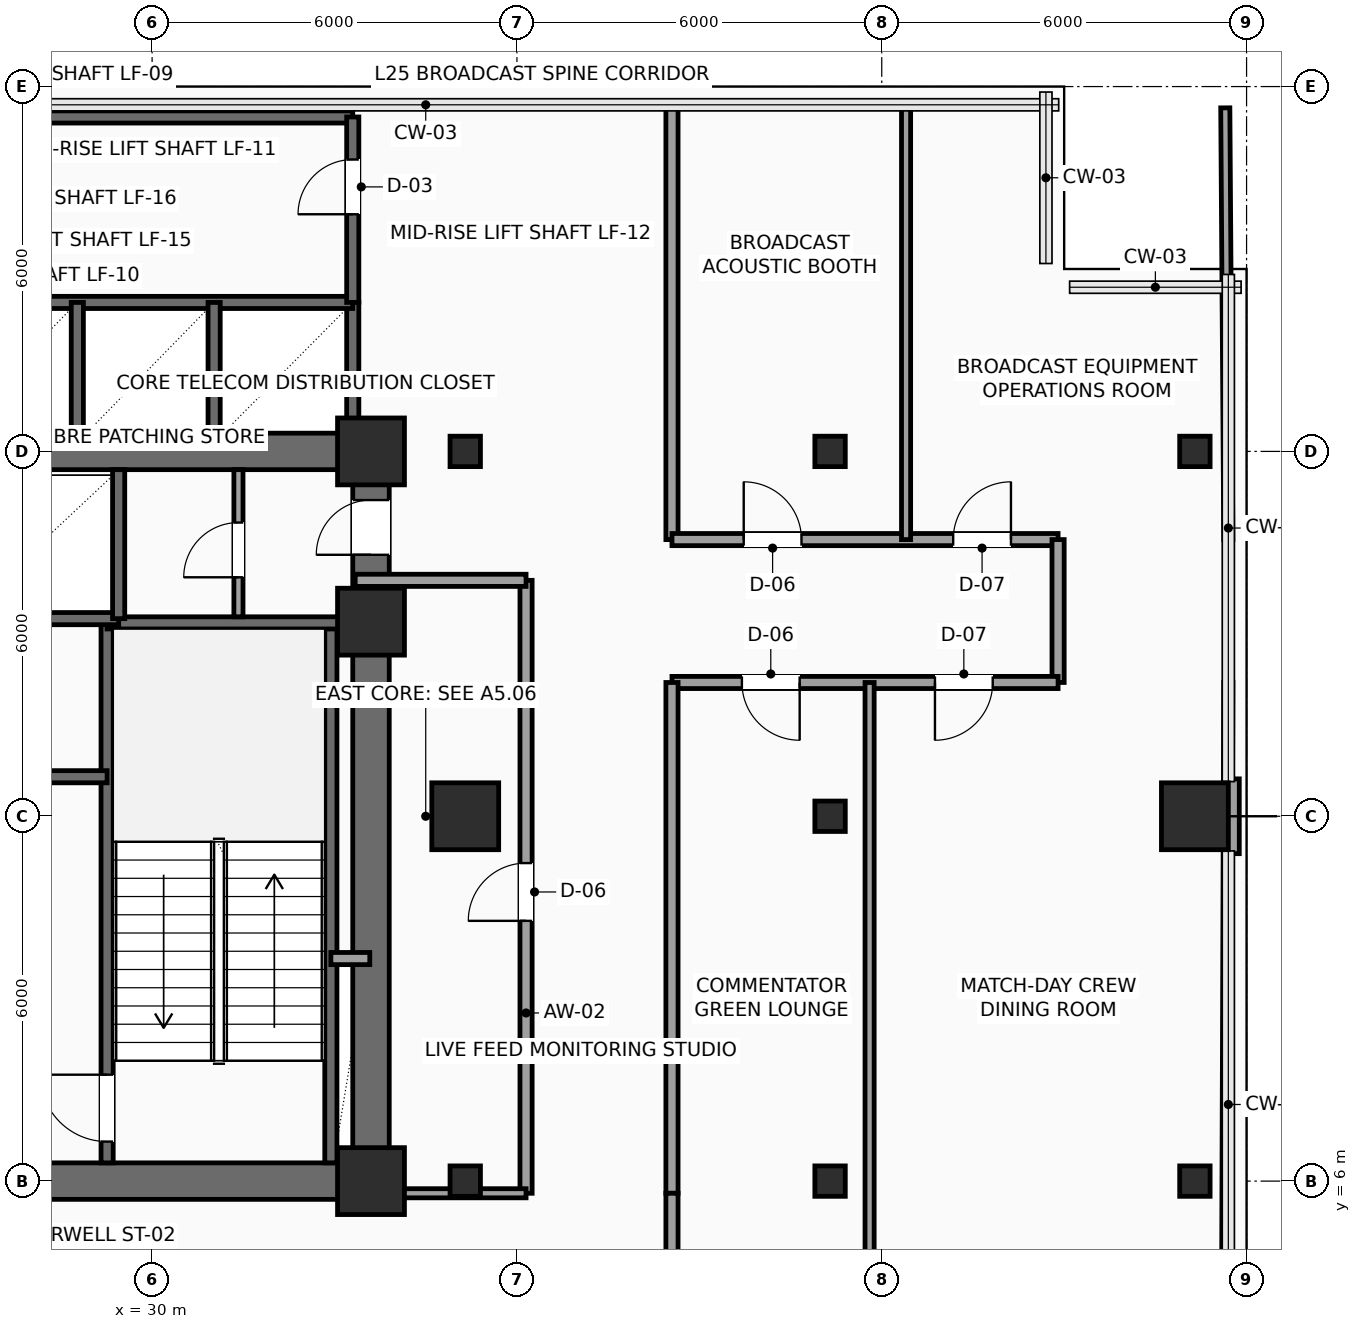
"""IFC4 building model, lengths in metres.
Left out: names, types, materials, properties, quantities, classifications, styles, units other than length and angle.
Written with IfcOpenShell. Run it as: python <this file> out.ifc"""

import sys

from ifc_helpers import new_model, si_unit, direction, frame, frame_2d, origin, origin_2d, place, context, subcontext, project, spatial, rectangle, hollow_rectangle, extrude, element, fill, save


model = new_model("IFC4")
c1 = context("Model", 3, precision=1e-05, world=origin(), true_north=direction((0.0, 1.0)))
c2 = subcontext(c1, "Body", "Model", "MODEL_VIEW")
j1 = project(units=[si_unit("LENGTHUNIT", "METRE"), si_unit("PLANEANGLEUNIT", "RADIAN")], contexts=[c1])
p1 = place(None, origin())
s1 = spatial("IfcSite", under=j1, at=p1, CompositionType="ELEMENT")
p2 = place(p1, origin())
s2 = spatial("IfcBuilding", under=s1, at=p2, CompositionType="ELEMENT")
p3 = place(p2, frame((0.0, 0.0, 107.1)))
s3 = spatial("IfcBuildingStorey", under=s2, at=p3, CompositionType="ELEMENT", Elevation=107.1)
for number, where, z_axis, x_axis in (
    (1, (33.6, 6.0, 0.0), (0.0, 0.0, 1.0), (1.0, 0.0, 0.0)),
    (2, (33.6, 15.2, 0.0), (0.0, 0.0, 1.0), (1.0, 0.0, 0.0)),
    (3, (33.6, 18.0, 0.0), (0.0, 0.0, 1.0), (1.0, 0.0, 0.0)),
):
    element("IfcColumn", number, at=place(p3, frame(where, z_axis=z_axis, x_axis=x_axis)), inside=s3, PredefinedType="COLUMN", context=c2, shape_type="SweptSolid", body=[
        extrude(rectangle(XDim=1.1, YDim=1.1, at=origin_2d()), origin(), (0.0, 0.0, 1.0), 3.75),
    ])
p4 = place(p3, frame((35.15, 6.0, 0.0), z_axis=(0.0, 0.0, 1.0), x_axis=(1.0, 0.0, 0.0)))
e4 = element("IfcColumn", 4, at=p4, inside=s3, PredefinedType="COLUMN", context=c2, shape_type="SweptSolid", body=[
    extrude(hollow_rectangle(XDim=0.5, YDim=0.5, WallThickness=0.025, InnerFilletRadius=0.025, OuterFilletRadius=0.04, at=origin_2d()), origin(), (0.0, 0.0, 1.0), 3.75),
])
p5 = place(p3, frame((35.15, 12.0, 0.0), z_axis=(0.0, 0.0, 1.0), x_axis=(1.0, 0.0, 0.0)))
e5 = element("IfcColumn", 5, at=p5, inside=s3, PredefinedType="COLUMN", context=c2, shape_type="SweptSolid", body=[
    extrude(rectangle(XDim=1.1, YDim=1.1, at=origin_2d()), origin(), (0.0, 0.0, 1.0), 3.75),
])
for number, where, z_axis, x_axis in (
    (6, (35.15, 18.0, 0.0), (0.0, 0.0, 1.0), (1.0, 0.0, 0.0)),
    (7, (41.15, 6.0, 0.0), (0.0, 0.0, 1.0), (1.0, 0.0, 0.0)),
    (8, (41.15, 12.0, 0.0), (0.0, 0.0, 1.0), (1.0, 0.0, 0.0)),
    (9, (41.15, 18.0, 0.0), (0.0, 0.0, 1.0), (1.0, 0.0, 0.0)),
    (10, (47.15, 6.0, 0.0), (0.0, 0.0, 1.0), (1.0, 0.0, 0.0)),
):
    element("IfcColumn", number, at=place(p3, frame(where, z_axis=z_axis, x_axis=x_axis)), inside=s3, PredefinedType="COLUMN", context=c2, shape_type="SweptSolid", body=[
        extrude(hollow_rectangle(XDim=0.5, YDim=0.5, WallThickness=0.025, InnerFilletRadius=0.025, OuterFilletRadius=0.04, at=origin_2d()), origin(), (0.0, 0.0, 1.0), 3.75),
    ])
p6 = place(p3, frame((47.15, 12.0, 0.0), z_axis=(0.0, 0.0, 1.0), x_axis=(1.0, 0.0, 0.0)))
e11 = element("IfcColumn", 11, at=p6, inside=s3, PredefinedType="COLUMN", context=c2, shape_type="SweptSolid", body=[
    extrude(rectangle(XDim=1.1, YDim=1.1, at=origin_2d()), origin(), (0.0, 0.0, 1.0), 3.75),
])
p7 = place(p3, frame((47.15, 18.0, 0.0), z_axis=(0.0, 0.0, 1.0), x_axis=(1.0, 0.0, 0.0)))
e12 = element("IfcColumn", 12, at=p7, inside=s3, PredefinedType="COLUMN", context=c2, shape_type="SweptSolid", body=[
    extrude(hollow_rectangle(XDim=0.5, YDim=0.5, WallThickness=0.025, InnerFilletRadius=0.025, OuterFilletRadius=0.04, at=origin_2d()), origin(), (0.0, 0.0, 1.0), 3.75),
])
p8 = place(p3, frame((47.76, 12.615, 0.0), z_axis=(0.0, 0.0, 1.0), x_axis=(0.0, -1.0, 0.0)))
e13 = element("IfcWall", 13, at=p8, inside=s3, PredefinedType="SOLIDWALL", context=c2, shape_type="SweptSolid", body=[
    extrude(rectangle(XDim=1.23, YDim=0.24, at=frame_2d((0.615, 0.0))), origin(), (0.0, 0.0, 1.0), 3.475),
])
for number, where, z_axis, x_axis in (
    (14, (24.0, 6.0, 0.0), (0.0, 0.0, 1.0), (1.0, 0.0, 0.0)),
    (15, (24.0, 18.0, 0.0), (0.0, 0.0, 1.0), (1.0, 0.0, 0.0)),
):
    element("IfcWall", number, at=place(p3, frame(where, z_axis=z_axis, x_axis=x_axis)), inside=s3, PredefinedType="SHEAR", context=c2, shape_type="SweptSolid", body=[
        extrude(rectangle(XDim=9.6, YDim=0.6, at=frame_2d((4.8, 0.0))), origin(), (0.0, 0.0, 1.0), 3.475),
    ])
p9 = place(p3, frame((33.6, 6.0, 0.0), z_axis=(0.0, 0.0, 1.0), x_axis=(0.0, 1.0, 0.0)))
e16 = element("IfcWall", 16, at=p9, inside=s3, PredefinedType="SHEAR", context=c2, shape_type="SweptSolid", body=[
    extrude(rectangle(XDim=12.0, YDim=0.6, at=frame_2d((6.0, 0.0))), origin(), (0.0, 0.0, 1.0), 3.475),
])
p10 = place(p9, frame((10.3, 0.0, 0.0)))
e17 = element("IfcOpeningElement", 17, at=p10, cuts=e16, PredefinedType="OPENING", context=c2, shape_type="SweptSolid", body=[
    extrude(rectangle(XDim=0.9, YDim=2.15, at=frame_2d((0.45, 1.075))), frame((0.0, 0.31, 0.0), z_axis=(0.0, -1.0, 0.0), x_axis=(1.0, 0.0, 0.0)), (0.0, 0.0, 1.0), 0.62),
])
p11 = place(p3, frame((29.26, 6.3, 0.0), z_axis=(0.0, 0.0, 1.0), x_axis=(0.0, 1.0, 0.0)))
e18 = element("IfcWall", 18, at=p11, inside=s3, PredefinedType="SHEAR", context=c2, shape_type="SweptSolid", body=[
    extrude(rectangle(XDim=8.88, YDim=0.2, at=frame_2d((4.44, 0.0))), origin(), (0.0, 0.0, 1.0), 3.475),
])
p12 = place(p11, frame((0.35, 0.0, 0.0)))
e19 = element("IfcOpeningElement", 19, at=p12, cuts=e18, PredefinedType="OPENING", context=c2, shape_type="SweptSolid", body=[
    extrude(rectangle(XDim=1.1, YDim=2.2, at=frame_2d((0.55, 1.1))), frame((0.0, 0.11, 0.0), z_axis=(0.0, -1.0, 0.0), x_axis=(1.0, 0.0, 0.0)), (0.0, 0.0, 1.0), 0.22),
])
p13 = place(p3, frame((32.94, 6.3, 0.0), z_axis=(0.0, 0.0, 1.0), x_axis=(0.0, 1.0, 0.0)))
e20 = element("IfcWall", 20, at=p13, inside=s3, PredefinedType="SHEAR", context=c2, shape_type="SweptSolid", body=[
    extrude(rectangle(XDim=8.88, YDim=0.2, at=frame_2d((4.44, 0.0))), origin(), (0.0, 0.0, 1.0), 3.475),
])
p14 = place(p3, frame((29.26, 15.18, 0.0), z_axis=(0.0, 0.0, 1.0), x_axis=(1.0, 0.0, 0.0)))
e21 = element("IfcWall", 21, at=p14, inside=s3, PredefinedType="SHEAR", context=c2, shape_type="SweptSolid", body=[
    extrude(rectangle(XDim=4.04, YDim=0.2, at=frame_2d((2.02, 0.0))), origin(), (0.0, 0.0, 1.0), 3.475),
])
p15 = place(p3, frame((26.42, 12.65, 0.0), z_axis=(0.0, 0.0, 1.0), x_axis=(1.0, 0.0, 0.0)))
e22 = element("IfcWall", 22, at=p15, inside=s3, PredefinedType="SHEAR", context=c2, shape_type="SweptSolid", body=[
    extrude(rectangle(XDim=2.84, YDim=0.2, at=frame_2d((1.42, 0.0))), origin(), (0.0, 0.0, 1.0), 3.475),
])
p16 = place(p15, frame((0.9, 0.0, 0.0)))
e23 = element("IfcOpeningElement", 23, at=p16, cuts=e22, PredefinedType="OPENING", context=c2, shape_type="SweptSolid", body=[
    extrude(rectangle(XDim=0.9, YDim=2.15, at=frame_2d((0.45, 1.075))), frame((0.0, 0.11, 0.0), z_axis=(0.0, -1.0, 0.0), x_axis=(1.0, 0.0, 0.0)), (0.0, 0.0, 1.0), 0.22),
])
p17 = place(p3, frame((32.94, 9.66, 0.0), z_axis=(0.0, 0.0, 1.0), x_axis=(1.0, 0.0, 0.0)))
e24 = element("IfcWall", 24, at=p17, inside=s3, PredefinedType="SOLIDWALL", context=c2, shape_type="SweptSolid", body=[
    extrude(rectangle(XDim=0.64, YDim=0.2, at=frame_2d((0.32, 0.0))), origin(), (0.0, 0.0, 1.0), 3.475),
])
p18 = place(p3, frame((24.25, 15.25, 0.0), z_axis=(0.0, 0.0, 1.0), x_axis=(1.0, 0.0, 0.0)))
e25 = element("IfcWall", 25, at=p18, inside=s3, PredefinedType="SHEAR", context=c2, shape_type="SweptSolid", body=[
    extrude(rectangle(XDim=5.2, YDim=0.2, at=frame_2d((2.6, 0.0))), origin(), (0.0, 0.0, 1.0), 3.475),
])
p19 = place(p3, frame((29.45, 15.25, 0.0), z_axis=(0.0, 0.0, 1.0), x_axis=(0.0, 1.0, 0.0)))
e26 = element("IfcWall", 26, at=p19, inside=s3, PredefinedType="SHEAR", context=c2, shape_type="SweptSolid", body=[
    extrude(rectangle(XDim=2.45, YDim=0.2, at=frame_2d((1.225, 0.0))), origin(), (0.0, 0.0, 1.0), 3.475),
])
p20 = place(p3, frame((31.42, 15.28, 0.0), z_axis=(0.0, 0.0, 1.0), x_axis=(0.0, 1.0, 0.0)))
e27 = element("IfcWall", 27, at=p20, inside=s3, PredefinedType="PARTITIONING", context=c2, shape_type="SweptSolid", body=[
    extrude(rectangle(XDim=2.42, YDim=0.15, at=frame_2d((1.21, 0.0))), origin(), (0.0, 0.0, 1.0), 3.475),
])
p21 = place(p20, frame((0.65, 0.0, 0.0)))
e28 = element("IfcOpeningElement", 28, at=p21, cuts=e27, PredefinedType="OPENING", context=c2, shape_type="SweptSolid", body=[
    extrude(rectangle(XDim=0.9, YDim=2.15, at=frame_2d((0.45, 1.075))), frame((0.0, 0.085, 0.0), z_axis=(0.0, -1.0, 0.0), x_axis=(1.0, 0.0, 0.0)), (0.0, 0.0, 1.0), 0.17),
])
p22 = place(p3, frame((33.3, 18.1, 0.0), z_axis=(0.0, 0.0, 1.0), x_axis=(0.0, 1.0, 0.0)))
e29 = element("IfcWall", 29, at=p22, inside=s3, PredefinedType="SHEAR", context=c2, shape_type="SweptSolid", body=[
    extrude(rectangle(XDim=2.35, YDim=0.2, at=frame_2d((1.175, 0.0))), origin(), (0.0, 0.0, 1.0), 3.475),
])
p23 = place(p3, frame((24.25, 20.45, 0.0), z_axis=(0.0, 0.0, 1.0), x_axis=(1.0, 0.0, 0.0)))
e30 = element("IfcWall", 30, at=p23, inside=s3, PredefinedType="SHEAR", context=c2, shape_type="SweptSolid", body=[
    extrude(rectangle(XDim=9.05, YDim=0.2, at=frame_2d((4.525, 0.0))), origin(), (0.0, 0.0, 1.0), 3.475),
])
for number, where, z_axis, x_axis in (
    (31, (28.77, 18.15, 0.0), (0.0, 0.0, 1.0), (0.0, 1.0, 0.0)),
    (32, (31.02, 18.15, 0.0), (0.0, 0.0, 1.0), (0.0, 1.0, 0.0)),
):
    element("IfcWall", number, at=place(p3, frame(where, z_axis=z_axis, x_axis=x_axis)), inside=s3, PredefinedType="SHEAR", context=c2, shape_type="SweptSolid", body=[
        extrude(rectangle(XDim=2.3, YDim=0.2, at=frame_2d((1.15, 0.0))), origin(), (0.0, 0.0, 1.0), 3.475),
    ])
p24 = place(p3, frame((24.15, 23.5, 0.0), z_axis=(0.0, 0.0, 1.0), x_axis=(1.0, 0.0, 0.0)))
e33 = element("IfcWall", 33, at=p24, inside=s3, PredefinedType="SHEAR", context=c2, shape_type="SweptSolid", body=[
    extrude(rectangle(XDim=9.15, YDim=0.2, at=frame_2d((4.575, 0.0))), origin(), (0.0, 0.0, 1.0), 3.475),
])
p25 = place(p3, frame((33.3, 20.45, 0.0), z_axis=(0.0, 0.0, 1.0), x_axis=(0.0, 1.0, 0.0)))
e34 = element("IfcWall", 34, at=p25, inside=s3, PredefinedType="SHEAR", context=c2, shape_type="SweptSolid", body=[
    extrude(rectangle(XDim=3.05, YDim=0.2, at=frame_2d((1.525, 0.0))), origin(), (0.0, 0.0, 1.0), 3.475),
])
p26 = place(p25, frame((1.45, 0.0, 0.0)))
e35 = element("IfcOpeningElement", 35, at=p26, cuts=e34, PredefinedType="OPENING", context=c2, shape_type="SweptSolid", body=[
    extrude(rectangle(XDim=0.9, YDim=2.15, at=frame_2d((0.45, 1.075))), frame((0.0, 0.11, 0.0), z_axis=(0.0, -1.0, 0.0), x_axis=(1.0, 0.0, 0.0)), (0.0, 0.0, 1.0), 0.22),
])
p27 = place(p3, frame((36.15, 5.8, 0.0), z_axis=(0.0, 0.0, 1.0), x_axis=(0.0, 1.0, 0.0)))
e36 = element("IfcWall", 36, at=p27, inside=s3, PredefinedType="PARTITIONING", context=c2, shape_type="SweptSolid", body=[
    extrude(rectangle(XDim=10.08, YDim=0.2, at=frame_2d((5.04, 0.0))), origin(), (0.0, 0.0, 1.0), 3.475),
])
p28 = place(p27, frame((4.48, 0.0, 0.0)))
e37 = element("IfcOpeningElement", 37, at=p28, cuts=e36, PredefinedType="OPENING", context=c2, shape_type="SweptSolid", body=[
    extrude(rectangle(XDim=0.95, YDim=2.15, at=frame_2d((0.475, 1.075))), frame((0.0, 0.11, 0.0), z_axis=(0.0, -1.0, 0.0), x_axis=(1.0, 0.0, 0.0)), (0.0, 0.0, 1.0), 0.22),
])
p29 = place(p3, frame((36.15, 15.88, 0.0), z_axis=(0.0, 0.0, 1.0), x_axis=(-1.0, 0.0, 0.0)))
e38 = element("IfcWall", 38, at=p29, inside=s3, PredefinedType="PARTITIONING", context=c2, shape_type="SweptSolid", body=[
    extrude(rectangle(XDim=2.81, YDim=0.2, at=frame_2d((1.405, 0.0))), origin(), (0.0, 0.0, 1.0), 3.475),
])
p30 = place(p3, frame((38.55, 23.7, 0.0), z_axis=(0.0, 0.0, 1.0), x_axis=(0.0, -1.0, 0.0)))
e39 = element("IfcWall", 39, at=p30, inside=s3, PredefinedType="PARTITIONING", context=c2, shape_type="SweptSolid", body=[
    extrude(rectangle(XDim=7.15, YDim=0.2, at=frame_2d((3.575, 0.0))), origin(), (0.0, 0.0, 1.0), 3.475),
])
p31 = place(p3, frame((38.55, 16.55, 0.0), z_axis=(0.0, 0.0, 1.0), x_axis=(1.0, 0.0, 0.0)))
e40 = element("IfcWall", 40, at=p31, inside=s3, PredefinedType="PARTITIONING", context=c2, shape_type="SweptSolid", body=[
    extrude(rectangle(XDim=6.35, YDim=0.2, at=frame_2d((3.175, 0.0))), origin(), (0.0, 0.0, 1.0), 3.475),
])
p32 = place(p31, frame((1.18, 0.0, 0.0)))
e41 = element("IfcOpeningElement", 41, at=p32, cuts=e40, PredefinedType="OPENING", context=c2, shape_type="SweptSolid", body=[
    extrude(rectangle(XDim=0.95, YDim=2.15, at=frame_2d((0.475, 1.075))), frame((0.0, 0.11, 0.0), z_axis=(0.0, -1.0, 0.0), x_axis=(1.0, 0.0, 0.0)), (0.0, 0.0, 1.0), 0.22),
])
p33 = place(p31, frame((4.625, 0.0, 0.0)))
e42 = element("IfcOpeningElement", 42, at=p33, cuts=e40, PredefinedType="OPENING", context=c2, shape_type="SweptSolid", body=[
    extrude(rectangle(XDim=0.95, YDim=2.15, at=frame_2d((0.475, 1.075))), frame((0.0, 0.11, 0.0), z_axis=(0.0, -1.0, 0.0), x_axis=(1.0, 0.0, 0.0)), (0.0, 0.0, 1.0), 0.22),
])
p34 = place(p3, frame((44.9, 16.55, 0.0), z_axis=(0.0, 0.0, 1.0), x_axis=(0.0, -1.0, 0.0)))
e43 = element("IfcWall", 43, at=p34, inside=s3, PredefinedType="PARTITIONING", context=c2, shape_type="SweptSolid", body=[
    extrude(rectangle(XDim=2.35, YDim=0.2, at=frame_2d((1.175, 0.0))), origin(), (0.0, 0.0, 1.0), 3.475),
])
p35 = place(p3, frame((44.9, 14.2, 0.0), z_axis=(0.0, 0.0, 1.0), x_axis=(-1.0, 0.0, 0.0)))
e44 = element("IfcWall", 44, at=p35, inside=s3, PredefinedType="PARTITIONING", context=c2, shape_type="SweptSolid", body=[
    extrude(rectangle(XDim=6.35, YDim=0.2, at=frame_2d((3.175, 0.0))), origin(), (0.0, 0.0, 1.0), 3.475),
])
p36 = place(p35, frame((4.25, 0.0, 0.0)))
e45 = element("IfcOpeningElement", 45, at=p36, cuts=e44, PredefinedType="OPENING", context=c2, shape_type="SweptSolid", body=[
    extrude(rectangle(XDim=0.95, YDim=2.15, at=frame_2d((0.475, 1.075))), frame((0.0, 0.11, 0.0), z_axis=(0.0, -1.0, 0.0), x_axis=(1.0, 0.0, 0.0)), (0.0, 0.0, 1.0), 0.22),
])
p37 = place(p35, frame((1.075, 0.0, 0.0)))
e46 = element("IfcOpeningElement", 46, at=p37, cuts=e44, PredefinedType="OPENING", context=c2, shape_type="SweptSolid", body=[
    extrude(rectangle(XDim=0.95, YDim=2.15, at=frame_2d((0.475, 1.075))), frame((0.0, 0.11, 0.0), z_axis=(0.0, -1.0, 0.0), x_axis=(1.0, 0.0, 0.0)), (0.0, 0.0, 1.0), 0.22),
])
p38 = place(p3, frame((38.55, 14.2, 0.0), z_axis=(0.0, 0.0, 1.0), x_axis=(0.0, -1.0, 0.0)))
e47 = element("IfcWall", 47, at=p38, inside=s3, PredefinedType="PARTITIONING", context=c2, shape_type="SweptSolid", body=[
    extrude(rectangle(XDim=8.4, YDim=0.2, at=frame_2d((4.2, 0.0))), origin(), (0.0, 0.0, 1.0), 3.475),
])
p39 = place(p3, frame((38.55, 5.8, 0.0), z_axis=(0.0, 0.0, 1.0), x_axis=(0.0, -1.0, 0.0)))
e48 = element("IfcWall", 48, at=p39, inside=s3, PredefinedType="PARTITIONING", context=c2, shape_type="SweptSolid", body=[
    extrude(rectangle(XDim=2.35, YDim=0.2, at=frame_2d((1.175, 0.0))), origin(), (0.0, 0.0, 1.0), 3.475),
])
p40 = place(p3, frame((41.8, 0.3, 0.0), z_axis=(0.0, 0.0, 1.0), x_axis=(0.0, 1.0, 0.0)))
e49 = element("IfcWall", 49, at=p40, inside=s3, PredefinedType="PARTITIONING", context=c2, shape_type="SweptSolid", body=[
    extrude(rectangle(XDim=13.9, YDim=0.15, at=frame_2d((6.95, 0.0))), origin(), (0.0, 0.0, 1.0), 3.475),
])
p41 = place(p3, frame((47.65, 0.35, 0.0), z_axis=(0.0, 0.0, 1.0), x_axis=(0.003606251025, 0.999993497456, 0.0)))
e50 = element("IfcWall", 50, at=p41, inside=s3, PredefinedType="PARTITIONING", context=c2, shape_type="SweptSolid", body=[
    extrude(rectangle(XDim=11.035, YDim=0.15, at=frame_2d((5.518, 0.0))), origin(), (0.0, 0.0, 1.0), 3.475),
])
p42 = place(p3, frame((47.694, 12.615, 0.0), z_axis=(0.0, 0.0, 1.0), x_axis=(0.003542799701, 0.999993724265, 0.0)))
e51 = element("IfcWall", 51, at=p42, inside=s3, PredefinedType="PARTITIONING", context=c2, shape_type="SweptSolid", body=[
    extrude(rectangle(XDim=1.585, YDim=0.15, at=frame_2d((0.792, 0.0))), origin(), (0.0, 0.0, 1.0), 3.475),
])
p43 = place(p3, frame((42.4, 16.55, 0.0), z_axis=(0.0, 0.0, 1.0), x_axis=(0.0, 1.0, 0.0)))
e52 = element("IfcWall", 52, at=p43, inside=s3, PredefinedType="PARTITIONING", context=c2, shape_type="SweptSolid", body=[
    extrude(rectangle(XDim=7.15, YDim=0.15, at=frame_2d((3.575, 0.0))), origin(), (0.0, 0.0, 1.0), 3.475),
])
p44 = place(p3, frame((47.7, 16.55, 0.0), z_axis=(0.0, 0.0, 1.0), x_axis=(-0.007049101019, 0.999975154779, 0.0)))
e53 = element("IfcWall", 53, at=p44, inside=s3, PredefinedType="PARTITIONING", context=c2, shape_type="SweptSolid", body=[
    extrude(rectangle(XDim=7.1, YDim=0.15, at=frame_2d((3.55, 0.0))), origin(), (0.0, 0.0, 1.0), 3.475),
])
p45 = place(p3, frame((33.65, 5.8, 0.0), z_axis=(0.0, 0.0, 1.0), x_axis=(1.0, 0.0, 0.0)))
e54 = element("IfcWall", 54, at=p45, inside=s3, PredefinedType="PARTITIONING", context=c2, shape_type="SweptSolid", body=[
    extrude(rectangle(XDim=2.5, YDim=0.15, at=frame_2d((1.25, 0.0))), origin(), (0.0, 0.0, 1.0), 2.967),
])
p46 = place(p10, origin())
e55 = element("IfcDoor", 55, at=p46, inside=s3, OperationType="SINGLE_SWING_LEFT", PredefinedType="DOOR", context=c2, shape_type="SweptSolid", body=[
    extrude(rectangle(XDim=0.9, YDim=2.15, at=frame_2d((0.45, 1.075))), frame((0.0, 0.025, 0.0), z_axis=(0.0, -1.0, 0.0), x_axis=(1.0, 0.0, 0.0)), (0.0, 0.0, 1.0), 0.05),
])
fill(e17, e55)
p47 = place(p12, origin())
e56 = element("IfcDoor", 56, at=p47, inside=s3, OperationType="SINGLE_SWING_RIGHT", PredefinedType="DOOR", context=c2, shape_type="SweptSolid", body=[
    extrude(rectangle(XDim=1.1, YDim=2.2, at=frame_2d((0.55, 1.1))), frame((0.0, 0.025, 0.0), z_axis=(0.0, -1.0, 0.0), x_axis=(1.0, 0.0, 0.0)), (0.0, 0.0, 1.0), 0.05),
])
fill(e19, e56)
p48 = place(p21, origin())
e57 = element("IfcDoor", 57, at=p48, inside=s3, OperationType="SINGLE_SWING_LEFT", PredefinedType="DOOR", context=c2, shape_type="SweptSolid", body=[
    extrude(rectangle(XDim=0.9, YDim=2.15, at=frame_2d((0.45, 1.075))), frame((0.0, 0.025, 0.0), z_axis=(0.0, -1.0, 0.0), x_axis=(1.0, 0.0, 0.0)), (0.0, 0.0, 1.0), 0.05),
])
fill(e28, e57)
p49 = place(p26, origin())
e58 = element("IfcDoor", 58, at=p49, inside=s3, OperationType="SINGLE_SWING_LEFT", PredefinedType="DOOR", context=c2, shape_type="SweptSolid", body=[
    extrude(rectangle(XDim=0.9, YDim=2.15, at=frame_2d((0.45, 1.075))), frame((0.0, 0.025, 0.0), z_axis=(0.0, -1.0, 0.0), x_axis=(1.0, 0.0, 0.0)), (0.0, 0.0, 1.0), 0.05),
])
fill(e35, e58)
p50 = place(p28, origin())
e59 = element("IfcDoor", 59, at=p50, inside=s3, OperationType="SINGLE_SWING_LEFT", PredefinedType="DOOR", context=c2, shape_type="SweptSolid", body=[
    extrude(rectangle(XDim=0.95, YDim=2.15, at=frame_2d((0.475, 1.075))), frame((0.0, 0.025, 0.0), z_axis=(0.0, -1.0, 0.0), x_axis=(1.0, 0.0, 0.0)), (0.0, 0.0, 1.0), 0.05),
])
fill(e37, e59)
p51 = place(p32, origin())
e60 = element("IfcDoor", 60, at=p51, inside=s3, OperationType="SINGLE_SWING_LEFT", PredefinedType="DOOR", context=c2, shape_type="SweptSolid", body=[
    extrude(rectangle(XDim=0.95, YDim=2.15, at=frame_2d((0.475, 1.075))), frame((0.0, 0.025, 0.0), z_axis=(0.0, -1.0, 0.0), x_axis=(1.0, 0.0, 0.0)), (0.0, 0.0, 1.0), 0.05),
])
fill(e41, e60)
p52 = place(p33, origin())
e61 = element("IfcDoor", 61, at=p52, inside=s3, OperationType="SINGLE_SWING_RIGHT", PredefinedType="DOOR", context=c2, shape_type="SweptSolid", body=[
    extrude(rectangle(XDim=0.95, YDim=2.15, at=frame_2d((0.475, 1.075))), frame((0.0, 0.025, 0.0), z_axis=(0.0, -1.0, 0.0), x_axis=(1.0, 0.0, 0.0)), (0.0, 0.0, 1.0), 0.05),
])
fill(e42, e61)
p53 = place(p36, origin())
e62 = element("IfcDoor", 62, at=p53, inside=s3, OperationType="SINGLE_SWING_LEFT", PredefinedType="DOOR", context=c2, shape_type="SweptSolid", body=[
    extrude(rectangle(XDim=0.95, YDim=2.15, at=frame_2d((0.475, 1.075))), frame((0.0, 0.025, 0.0), z_axis=(0.0, -1.0, 0.0), x_axis=(1.0, 0.0, 0.0)), (0.0, 0.0, 1.0), 0.05),
])
fill(e45, e62)
p54 = place(p37, origin())
e63 = element("IfcDoor", 63, at=p54, inside=s3, OperationType="SINGLE_SWING_RIGHT", PredefinedType="DOOR", context=c2, shape_type="SweptSolid", body=[
    extrude(rectangle(XDim=0.95, YDim=2.15, at=frame_2d((0.475, 1.075))), frame((0.0, 0.025, 0.0), z_axis=(0.0, -1.0, 0.0), x_axis=(1.0, 0.0, 0.0)), (0.0, 0.0, 1.0), 0.05),
])
fill(e46, e63)
save(model, sys.argv[1])
